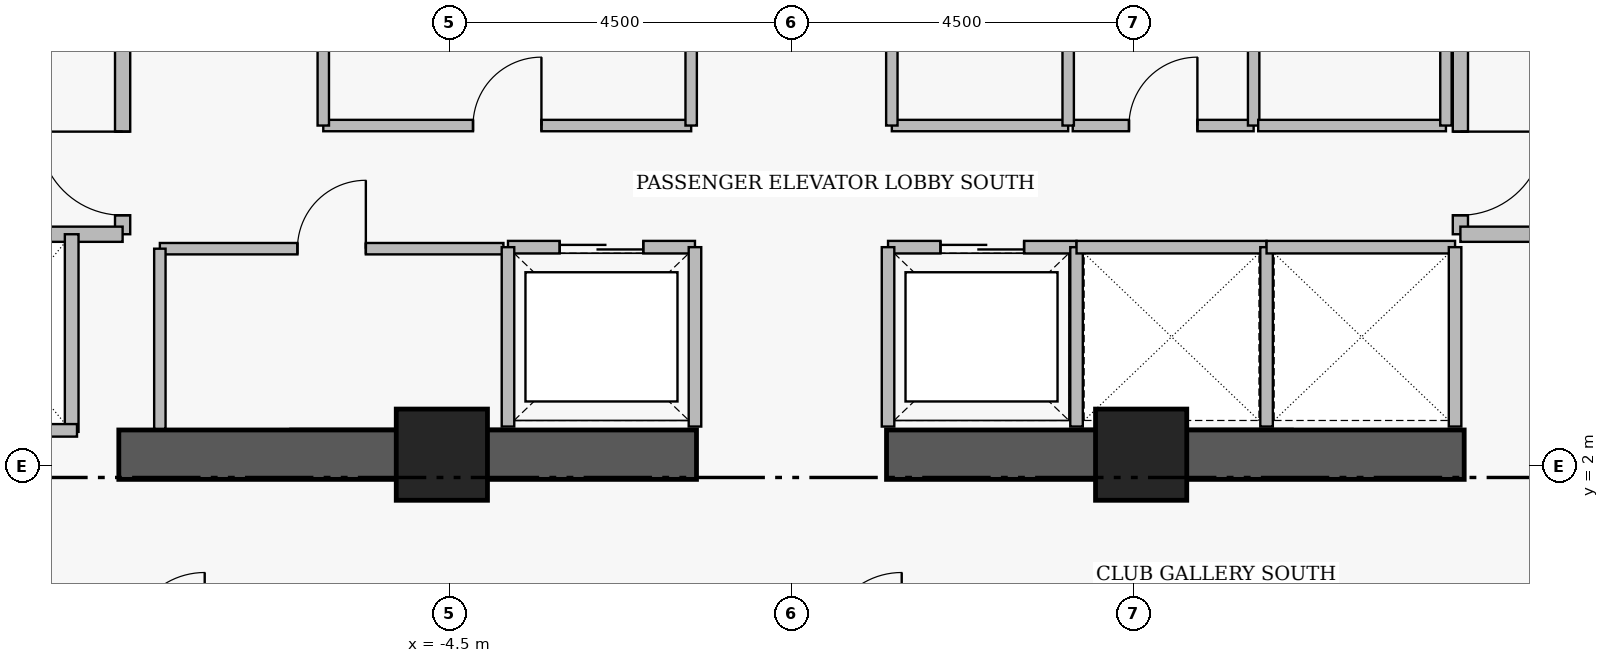
"""IFC4 building model, lengths in metres.
Left out: names, types, materials, properties, quantities, classifications, styles, units other than length and angle.
Written with IfcOpenShell. Run it as: python <this file> out.ifc"""

import sys

from ifc_helpers import new_model, si_unit, direction, frame, frame_2d, origin, origin_2d, place, context, subcontext, project, spatial, rectangle, extrude, element, fill, save


model = new_model("IFC4")
c1 = context("Model", 3, precision=1e-05, world=origin(), true_north=direction((0.0, 1.0)))
c2 = subcontext(c1, "Body", "Model", "MODEL_VIEW")
j1 = project(units=[si_unit("LENGTHUNIT", "METRE"), si_unit("PLANEANGLEUNIT", "RADIAN")], contexts=[c1])
p1 = place(None, origin())
s1 = spatial("IfcSite", under=j1, at=p1, CompositionType="ELEMENT")
p2 = place(p1, origin())
s2 = spatial("IfcBuilding", under=s1, at=p2, CompositionType="ELEMENT")
p3 = place(p2, frame((0.0, 0.0, 177.4)))
s3 = spatial("IfcBuildingStorey", under=s2, at=p3, CompositionType="ELEMENT", Elevation=177.4)
for number, where, z_axis, x_axis in (
    (1, (-8.85, 2.15, 0.0), (0.0, 0.0, 1.0), (1.0, 0.0, 0.0)),
    (2, (1.25, 2.15, 0.0), (0.0, 0.0, 1.0), (1.0, 0.0, 0.0)),
):
    element("IfcWall", number, at=place(p3, frame(where, z_axis=z_axis, x_axis=x_axis)), inside=s3, PredefinedType="SHEAR", context=c2, shape_type="SweptSolid", body=[
        extrude(rectangle(XDim=7.6, YDim=0.65, at=frame_2d((3.8, 0.0))), origin(), (0.0, 0.0, 1.0), 3.53),
    ])
for number, where, z_axis, x_axis in (
    (3, (-4.6, 2.15, 0.0), (0.0, 0.0, 1.0), (1.0, 0.0, 0.0)),
    (4, (4.6, 2.15, 0.0), (0.0, 0.0, 1.0), (1.0, 0.0, 0.0)),
):
    element("IfcColumn", number, at=place(p3, frame(where, z_axis=z_axis, x_axis=x_axis)), inside=s3, PredefinedType="COLUMN", context=c2, shape_type="SweptSolid", body=[
        extrude(rectangle(XDim=1.2, YDim=1.2, at=origin_2d()), origin(), (0.0, 0.0, 1.0), 3.75),
    ])
p4 = place(p3, frame((-8.8, 5.05, 0.0), z_axis=(0.0, 0.0, 1.0), x_axis=(0.0, 1.0, 0.0)))
e5 = element("IfcWall", 5, at=p4, inside=s3, PredefinedType="PARTITIONING", context=c2, shape_type="SweptSolid", body=[
    extrude(rectangle(XDim=6.1, YDim=0.2, at=frame_2d((3.05, 0.0))), origin(), (0.0, 0.0, 1.0), 3.53),
])
p5 = place(p4, frame((0.25, 0.0, 0.0)))
e6 = element("IfcOpeningElement", 6, at=p5, cuts=e5, PredefinedType="OPENING", context=c2, shape_type="SweptSolid", body=[
    extrude(rectangle(XDim=1.1, YDim=2.2, at=frame_2d((0.55, 1.1))), frame((0.0, 0.11, 0.0), z_axis=(0.0, -1.0, 0.0), x_axis=(1.0, 0.0, 0.0)), (0.0, 0.0, 1.0), 0.22),
])
p6 = place(p4, frame((3.85, 0.0, 0.0)))
e7 = element("IfcOpeningElement", 7, at=p6, cuts=e5, PredefinedType="OPENING", context=c2, shape_type="SweptSolid", body=[
    extrude(rectangle(XDim=1.1, YDim=2.2, at=frame_2d((0.55, 1.1))), frame((0.0, 0.11, 0.0), z_axis=(0.0, -1.0, 0.0), x_axis=(1.0, 0.0, 0.0)), (0.0, 0.0, 1.0), 0.22),
])
p7 = place(p3, frame((8.8, 11.15, 0.0), z_axis=(0.0, 0.0, 1.0), x_axis=(0.0, -1.0, 0.0)))
e8 = element("IfcWall", 8, at=p7, inside=s3, PredefinedType="PARTITIONING", context=c2, shape_type="SweptSolid", body=[
    extrude(rectangle(XDim=6.1, YDim=0.2, at=frame_2d((3.05, 0.0))), origin(), (0.0, 0.0, 1.0), 3.53),
])
p8 = place(p7, frame((1.15, 0.0, 0.0)))
e9 = element("IfcOpeningElement", 9, at=p8, cuts=e8, PredefinedType="OPENING", context=c2, shape_type="SweptSolid", body=[
    extrude(rectangle(XDim=1.1, YDim=2.2, at=frame_2d((0.55, 1.1))), frame((0.0, 0.11, 0.0), z_axis=(0.0, -1.0, 0.0), x_axis=(1.0, 0.0, 0.0)), (0.0, 0.0, 1.0), 0.22),
])
p9 = place(p7, frame((4.75, 0.0, 0.0)))
e10 = element("IfcOpeningElement", 10, at=p9, cuts=e8, PredefinedType="OPENING", context=c2, shape_type="SweptSolid", body=[
    extrude(rectangle(XDim=1.1, YDim=2.2, at=frame_2d((0.55, 1.1))), frame((0.0, 0.11, 0.0), z_axis=(0.0, -1.0, 0.0), x_axis=(1.0, 0.0, 0.0)), (0.0, 0.0, 1.0), 0.22),
])
p10 = place(p3, frame((-3.73, 4.88, 0.0), z_axis=(0.0, 0.0, 1.0), x_axis=(1.0, 0.0, 0.0)))
e11 = element("IfcWall", 11, at=p10, inside=s3, PredefinedType="PARTITIONING", context=c2, shape_type="SweptSolid", body=[
    extrude(rectangle(XDim=2.46, YDim=0.165, at=frame_2d((1.23, 0.0))), origin(), (0.0, 0.0, 1.0), 3.53),
])
p11 = place(p10, frame((0.68, 0.0, 0.0)))
e12 = element("IfcOpeningElement", 12, at=p11, cuts=e11, PredefinedType="OPENING", context=c2, shape_type="SweptSolid", body=[
    extrude(rectangle(XDim=1.1, YDim=2.25, at=frame_2d((0.55, 1.125))), frame((0.0, 0.093, 0.0), z_axis=(0.0, -1.0, 0.0), x_axis=(1.0, 0.0, 0.0)), (0.0, 0.0, 1.0), 0.185),
])
p12 = place(p3, frame((1.27, 4.88, 0.0), z_axis=(0.0, 0.0, 1.0), x_axis=(1.0, 0.0, 0.0)))
e13 = element("IfcWall", 13, at=p12, inside=s3, PredefinedType="PARTITIONING", context=c2, shape_type="SweptSolid", body=[
    extrude(rectangle(XDim=2.48, YDim=0.165, at=frame_2d((1.24, 0.0))), origin(), (0.0, 0.0, 1.0), 3.53),
])
p13 = place(p12, frame((0.69, 0.0, 0.0)))
e14 = element("IfcOpeningElement", 14, at=p13, cuts=e13, PredefinedType="OPENING", context=c2, shape_type="SweptSolid", body=[
    extrude(rectangle(XDim=1.1, YDim=2.25, at=frame_2d((0.55, 1.125))), frame((0.0, 0.093, 0.0), z_axis=(0.0, -1.0, 0.0), x_axis=(1.0, 0.0, 0.0)), (0.0, 0.0, 1.0), 0.185),
])
p14 = place(p3, frame((-8.31, 4.86, 0.0), z_axis=(0.0, 0.0, 1.0), x_axis=(1.0, 0.0, 0.0)))
e15 = element("IfcWall", 15, at=p14, inside=s3, PredefinedType="PARTITIONING", context=c2, shape_type="SweptSolid", body=[
    extrude(rectangle(XDim=4.52, YDim=0.15, at=frame_2d((2.26, 0.0))), origin(), (0.0, 0.0, 1.0), 3.53),
])
p15 = place(p14, frame((1.81, 0.0, 0.0)))
e16 = element("IfcOpeningElement", 16, at=p15, cuts=e15, PredefinedType="OPENING", context=c2, shape_type="SweptSolid", body=[
    extrude(rectangle(XDim=0.9, YDim=2.15, at=frame_2d((0.45, 1.075))), frame((0.0, 0.085, 0.0), z_axis=(0.0, -1.0, 0.0), x_axis=(1.0, 0.0, 0.0)), (0.0, 0.0, 1.0), 0.17),
])
p16 = place(p3, frame((-6.16, 6.48, 0.0), z_axis=(0.0, 0.0, 1.0), x_axis=(1.0, 0.0, 0.0)))
e17 = element("IfcWall", 17, at=p16, inside=s3, PredefinedType="PARTITIONING", context=c2, shape_type="SweptSolid", body=[
    extrude(rectangle(XDim=4.84, YDim=0.15, at=frame_2d((2.42, 0.0))), origin(), (0.0, 0.0, 1.0), 3.53),
])
p17 = place(p16, frame((1.97, 0.0, 0.0)))
e18 = element("IfcOpeningElement", 18, at=p17, cuts=e17, PredefinedType="OPENING", context=c2, shape_type="SweptSolid", body=[
    extrude(rectangle(XDim=0.9, YDim=2.15, at=frame_2d((0.45, 1.075))), frame((0.0, 0.085, 0.0), z_axis=(0.0, -1.0, 0.0), x_axis=(1.0, 0.0, 0.0)), (0.0, 0.0, 1.0), 0.17),
])
p18 = place(p3, frame((3.7, 6.48, 0.0), z_axis=(0.0, 0.0, 1.0), x_axis=(1.0, 0.0, 0.0)))
e19 = element("IfcWall", 19, at=p18, inside=s3, PredefinedType="PARTITIONING", context=c2, shape_type="SweptSolid", body=[
    extrude(rectangle(XDim=2.38, YDim=0.15, at=frame_2d((1.19, 0.0))), origin(), (0.0, 0.0, 1.0), 3.53),
])
p19 = place(p18, frame((0.74, 0.0, 0.0)))
e20 = element("IfcOpeningElement", 20, at=p19, cuts=e19, PredefinedType="OPENING", context=c2, shape_type="SweptSolid", body=[
    extrude(rectangle(XDim=0.9, YDim=2.15, at=frame_2d((0.45, 1.075))), frame((0.0, 0.085, 0.0), z_axis=(0.0, -1.0, 0.0), x_axis=(1.0, 0.0, 0.0)), (0.0, 0.0, 1.0), 0.17),
])
for number, where, z_axis, x_axis in (
    (21, (-11.65, 5.05, 0.0), (0.0, 0.0, 1.0), (1.0, 0.0, 0.0)),
    (22, (8.8, 5.05, 0.0), (0.0, 0.0, 1.0), (1.0, 0.0, 0.0)),
):
    element("IfcWall", number, at=place(p3, frame(where, z_axis=z_axis, x_axis=x_axis)), inside=s3, PredefinedType="PARTITIONING", context=c2, shape_type="SweptSolid", body=[
        extrude(rectangle(XDim=2.85, YDim=0.2, at=frame_2d((1.425, 0.0))), origin(), (0.0, 0.0, 1.0), 3.53),
    ])
for number, where, z_axis, x_axis in (
    (23, (-3.73, 2.52, 0.0), (0.0, 0.0, 1.0), (0.0, 1.0, 0.0)),
    (24, (-1.27, 2.52, 0.0), (0.0, 0.0, 1.0), (0.0, 1.0, 0.0)),
    (25, (1.27, 2.52, 0.0), (0.0, 0.0, 1.0), (0.0, 1.0, 0.0)),
    (26, (3.75, 2.52, 0.0), (0.0, 0.0, 1.0), (0.0, 1.0, 0.0)),
):
    element("IfcWall", number, at=place(p3, frame(where, z_axis=z_axis, x_axis=x_axis)), inside=s3, PredefinedType="PARTITIONING", context=c2, shape_type="SweptSolid", body=[
        extrude(rectangle(XDim=2.36, YDim=0.165, at=frame_2d((1.18, 0.0))), origin(), (0.0, 0.0, 1.0), 3.53),
    ])
p20 = place(p3, frame((3.75, 4.88, 0.0), z_axis=(0.0, 0.0, 1.0), x_axis=(1.0, 0.0, 0.0)))
e27 = element("IfcWall", 27, at=p20, inside=s3, PredefinedType="PARTITIONING", context=c2, shape_type="SweptSolid", body=[
    extrude(rectangle(XDim=2.5, YDim=0.165, at=frame_2d((1.25, 0.0))), origin(), (0.0, 0.0, 1.0), 3.53),
])
p21 = place(p3, frame((6.25, 2.52, 0.0), z_axis=(0.0, 0.0, 1.0), x_axis=(0.0, 1.0, 0.0)))
e28 = element("IfcWall", 28, at=p21, inside=s3, PredefinedType="PARTITIONING", context=c2, shape_type="SweptSolid", body=[
    extrude(rectangle(XDim=2.36, YDim=0.165, at=frame_2d((1.18, 0.0))), origin(), (0.0, 0.0, 1.0), 3.53),
])
p22 = place(p3, frame((6.25, 4.88, 0.0), z_axis=(0.0, 0.0, 1.0), x_axis=(1.0, 0.0, 0.0)))
e29 = element("IfcWall", 29, at=p22, inside=s3, PredefinedType="PARTITIONING", context=c2, shape_type="SweptSolid", body=[
    extrude(rectangle(XDim=2.48, YDim=0.165, at=frame_2d((1.24, 0.0))), origin(), (0.0, 0.0, 1.0), 3.53),
])
p23 = place(p3, frame((8.73, 2.52, 0.0), z_axis=(0.0, 0.0, 1.0), x_axis=(0.0, 1.0, 0.0)))
e30 = element("IfcWall", 30, at=p23, inside=s3, PredefinedType="PARTITIONING", context=c2, shape_type="SweptSolid", body=[
    extrude(rectangle(XDim=2.36, YDim=0.165, at=frame_2d((1.18, 0.0))), origin(), (0.0, 0.0, 1.0), 3.53),
])
p24 = place(p3, frame((-8.31, 2.49, 0.0), z_axis=(0.0, 0.0, 1.0), x_axis=(0.0, 1.0, 0.0)))
e31 = element("IfcWall", 31, at=p24, inside=s3, PredefinedType="PARTITIONING", context=c2, shape_type="SweptSolid", body=[
    extrude(rectangle(XDim=2.37, YDim=0.15, at=frame_2d((1.185, 0.0))), origin(), (0.0, 0.0, 1.0), 3.53),
])
p25 = place(p3, frame((-9.47, 2.45, 0.0), z_axis=(0.0, 0.0, 1.0), x_axis=(0.0, 1.0, 0.0)))
e32 = element("IfcWall", 32, at=p25, inside=s3, PredefinedType="PARTITIONING", context=c2, shape_type="SweptSolid", body=[
    extrude(rectangle(XDim=2.6, YDim=0.18, at=frame_2d((1.3, 0.0))), origin(), (0.0, 0.0, 1.0), 3.53),
])
p26 = place(p3, frame((-11.71, 2.47, 0.0), z_axis=(0.0, 0.0, 1.0), x_axis=(1.0, 0.0, 0.0)))
e33 = element("IfcWall", 33, at=p26, inside=s3, PredefinedType="PARTITIONING", context=c2, shape_type="SweptSolid", body=[
    extrude(rectangle(XDim=2.31, YDim=0.165, at=frame_2d((1.155, 0.0))), origin(), (0.0, 0.0, 1.0), 2.43),
])
for number, where, z_axis, x_axis in (
    (34, (-6.16, 6.48, 0.0), (0.0, 0.0, 1.0), (0.0, 1.0, 0.0)),
    (35, (-1.32, 6.48, 0.0), (0.0, 0.0, 1.0), (0.0, 1.0, 0.0)),
):
    element("IfcWall", number, at=place(p3, frame(where, z_axis=z_axis, x_axis=x_axis)), inside=s3, PredefinedType="PARTITIONING", context=c2, shape_type="SweptSolid", body=[
        extrude(rectangle(XDim=2.24, YDim=0.15, at=frame_2d((1.12, 0.0))), origin(), (0.0, 0.0, 1.0), 3.53),
    ])
p27 = place(p3, frame((1.32, 6.48, 0.0), z_axis=(0.0, 0.0, 1.0), x_axis=(1.0, 0.0, 0.0)))
e36 = element("IfcWall", 36, at=p27, inside=s3, PredefinedType="PARTITIONING", context=c2, shape_type="SweptSolid", body=[
    extrude(rectangle(XDim=2.32, YDim=0.15, at=frame_2d((1.16, 0.0))), origin(), (0.0, 0.0, 1.0), 3.53),
])
for number, where, z_axis, x_axis in (
    (37, (1.32, 6.48, 0.0), (0.0, 0.0, 1.0), (0.0, 1.0, 0.0)),
    (38, (3.64, 6.48, 0.0), (0.0, 0.0, 1.0), (0.0, 1.0, 0.0)),
    (39, (6.08, 6.48, 0.0), (0.0, 0.0, 1.0), (0.0, 1.0, 0.0)),
):
    element("IfcWall", number, at=place(p3, frame(where, z_axis=z_axis, x_axis=x_axis)), inside=s3, PredefinedType="PARTITIONING", context=c2, shape_type="SweptSolid", body=[
        extrude(rectangle(XDim=2.24, YDim=0.15, at=frame_2d((1.12, 0.0))), origin(), (0.0, 0.0, 1.0), 3.53),
    ])
p28 = place(p3, frame((6.14, 6.48, 0.0), z_axis=(0.0, 0.0, 1.0), x_axis=(1.0, 0.0, 0.0)))
e40 = element("IfcWall", 40, at=p28, inside=s3, PredefinedType="PARTITIONING", context=c2, shape_type="SweptSolid", body=[
    extrude(rectangle(XDim=2.47, YDim=0.15, at=frame_2d((1.235, 0.0))), origin(), (0.0, 0.0, 1.0), 3.53),
])
p29 = place(p3, frame((8.61, 6.48, 0.0), z_axis=(0.0, 0.0, 1.0), x_axis=(0.0, 1.0, 0.0)))
e41 = element("IfcWall", 41, at=p29, inside=s3, PredefinedType="PARTITIONING", context=c2, shape_type="SweptSolid", body=[
    extrude(rectangle(XDim=2.24, YDim=0.15, at=frame_2d((1.12, 0.0))), origin(), (0.0, 0.0, 1.0), 3.53),
])
p30 = place(p5, origin())
e42 = element("IfcDoor", 42, at=p30, inside=s3, OperationType="SINGLE_SWING_RIGHT", PredefinedType="DOOR", context=c2, shape_type="SweptSolid", body=[
    extrude(rectangle(XDim=1.1, YDim=2.2, at=frame_2d((0.55, 1.1))), frame((0.0, 0.025, 0.0), z_axis=(0.0, -1.0, 0.0), x_axis=(1.0, 0.0, 0.0)), (0.0, 0.0, 1.0), 0.05),
])
fill(e6, e42)
p31 = place(p9, origin())
e43 = element("IfcDoor", 43, at=p31, inside=s3, OperationType="SINGLE_SWING_LEFT", PredefinedType="DOOR", context=c2, shape_type="SweptSolid", body=[
    extrude(rectangle(XDim=1.1, YDim=2.2, at=frame_2d((0.55, 1.1))), frame((0.0, 0.025, 0.0), z_axis=(0.0, -1.0, 0.0), x_axis=(1.0, 0.0, 0.0)), (0.0, 0.0, 1.0), 0.05),
])
fill(e10, e43)
p32 = place(p11, origin())
e44 = element("IfcDoor", 44, at=p32, inside=s3, OperationType="SLIDING_TO_LEFT", PredefinedType="DOOR", context=c2, shape_type="SweptSolid", body=[
    extrude(rectangle(XDim=1.1, YDim=2.25, at=frame_2d((0.55, 1.125))), frame((0.0, 0.025, 0.0), z_axis=(0.0, -1.0, 0.0), x_axis=(1.0, 0.0, 0.0)), (0.0, 0.0, 1.0), 0.05),
])
fill(e12, e44)
p33 = place(p13, origin())
e45 = element("IfcDoor", 45, at=p33, inside=s3, OperationType="SLIDING_TO_LEFT", PredefinedType="DOOR", context=c2, shape_type="SweptSolid", body=[
    extrude(rectangle(XDim=1.1, YDim=2.25, at=frame_2d((0.55, 1.125))), frame((0.0, 0.025, 0.0), z_axis=(0.0, -1.0, 0.0), x_axis=(1.0, 0.0, 0.0)), (0.0, 0.0, 1.0), 0.05),
])
fill(e14, e45)
p34 = place(p15, origin())
e46 = element("IfcDoor", 46, at=p34, inside=s3, OperationType="SINGLE_SWING_RIGHT", PredefinedType="DOOR", context=c2, shape_type="SweptSolid", body=[
    extrude(rectangle(XDim=0.9, YDim=2.15, at=frame_2d((0.45, 1.075))), frame((0.0, 0.025, 0.0), z_axis=(0.0, -1.0, 0.0), x_axis=(1.0, 0.0, 0.0)), (0.0, 0.0, 1.0), 0.05),
])
fill(e16, e46)
p35 = place(p17, origin())
e47 = element("IfcDoor", 47, at=p35, inside=s3, OperationType="SINGLE_SWING_RIGHT", PredefinedType="DOOR", context=c2, shape_type="SweptSolid", body=[
    extrude(rectangle(XDim=0.9, YDim=2.15, at=frame_2d((0.45, 1.075))), frame((0.0, 0.025, 0.0), z_axis=(0.0, -1.0, 0.0), x_axis=(1.0, 0.0, 0.0)), (0.0, 0.0, 1.0), 0.05),
])
fill(e18, e47)
p36 = place(p19, origin())
e48 = element("IfcDoor", 48, at=p36, inside=s3, OperationType="SINGLE_SWING_RIGHT", PredefinedType="DOOR", context=c2, shape_type="SweptSolid", body=[
    extrude(rectangle(XDim=0.9, YDim=2.15, at=frame_2d((0.45, 1.075))), frame((0.0, 0.025, 0.0), z_axis=(0.0, -1.0, 0.0), x_axis=(1.0, 0.0, 0.0)), (0.0, 0.0, 1.0), 0.05),
])
fill(e20, e48)
save(model, sys.argv[1])
